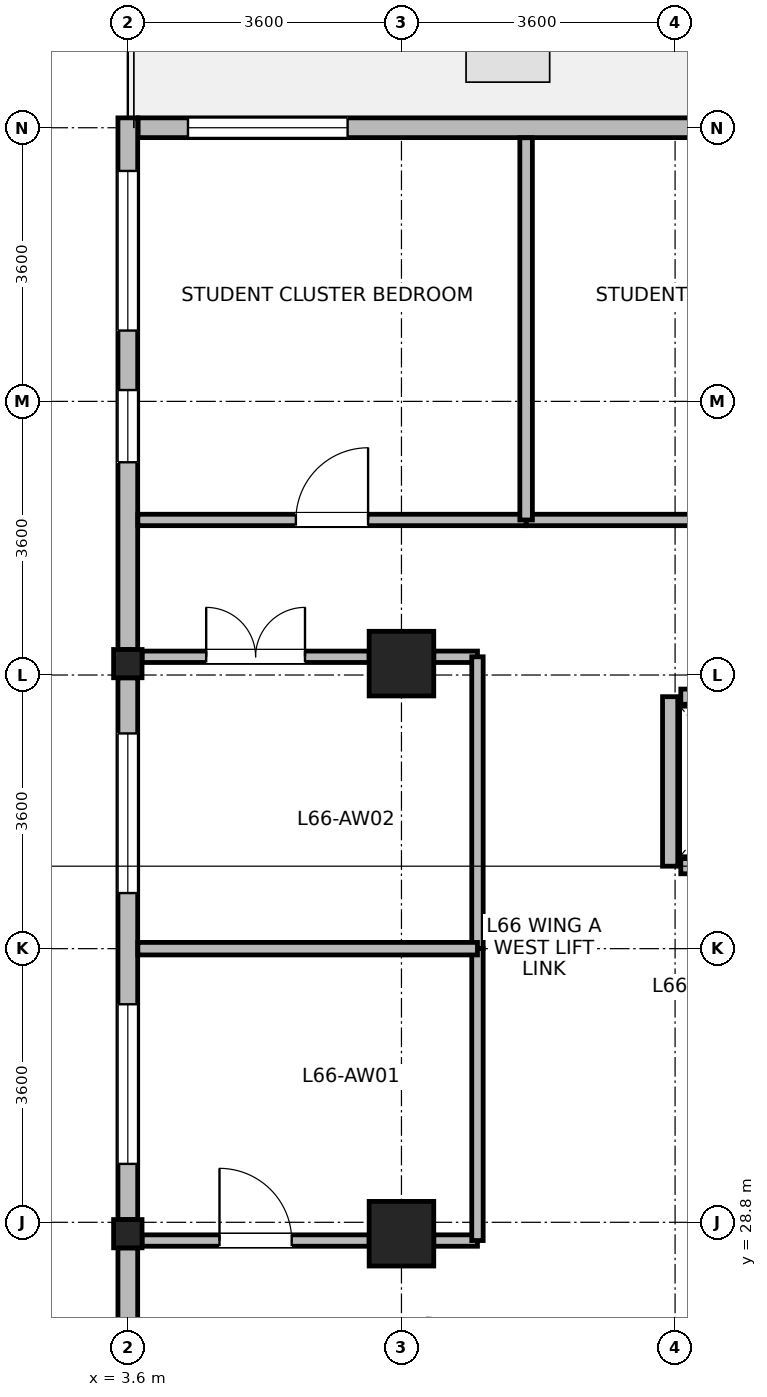
"""IFC4 building model, lengths in metres.
Left out: names, types, materials, properties, quantities, classifications, styles, units other than length and angle.
Written with IfcOpenShell. Run it as: python <this file> out.ifc"""

import sys

from ifc_helpers import new_model, si_unit, direction, frame, frame_2d, origin, origin_2d, place, context, subcontext, project, spatial, rectangle, i_section, extrude, source, transform, mapped, element, fill, save


model = new_model("IFC4")
c1 = context("Model", 3, precision=1e-05, world=origin(), true_north=direction((0.0, 1.0)))
c2 = subcontext(c1, "Body", "Model", "MODEL_VIEW")
j1 = project(units=[si_unit("LENGTHUNIT", "METRE"), si_unit("PLANEANGLEUNIT", "RADIAN")], contexts=[c1])
p1 = place(None, origin())
s1 = spatial("IfcSite", under=j1, at=p1, CompositionType="ELEMENT")
p2 = place(p1, origin())
s2 = spatial("IfcBuilding", under=s1, at=p2, CompositionType="ELEMENT")
p3 = place(p2, frame((0.0, 0.0, 257.3)))
s3 = spatial("IfcBuildingStorey", under=s2, at=p3, CompositionType="ELEMENT", Elevation=257.3)
m1 = source(origin(), c2, "Body", "SweptSolid", [
    extrude(rectangle(XDim=0.85, YDim=0.85, at=origin_2d()), origin(), (0.0, 0.0, 1.0), 3.7),
])
for number, where, z_axis, x_axis in (
    (1, (7.2, 28.65, 0.0), (0.0, 0.0, 1.0), (1.0, 0.0, 0.0)),
    (2, (7.2, 36.15, 0.0), (0.0, 0.0, 1.0), (1.0, 0.0, 0.0)),
):
    element("IfcColumn", number, at=place(p3, frame(where, z_axis=z_axis, x_axis=x_axis)), inside=s3, PredefinedType="COLUMN", context=c2, shape_type="MappedRepresentation", body=[
        mapped(m1, transform((0.0, 0.0, 0.0), x_axis=(1.0, 0.0, 0.0), y_axis=(0.0, 1.0, 0.0), z_axis=(0.0, 0.0, 1.0), scale=1.0)),
    ])
m2 = source(origin(), c2, "Body", "SweptSolid", [
    extrude(i_section(OverallWidth=0.374, OverallDepth=0.372, WebThickness=0.015, FlangeThickness=0.026, FilletRadius=0.015, at=origin_2d()), origin(), (0.0, 0.0, 1.0), 3.7),
])
for number, where, z_axis, x_axis in (
    (3, (3.6, 28.65, 0.0), (0.0, 0.0, 1.0), (1.0, 0.0, 0.0)),
    (4, (3.6, 36.15, 0.0), (0.0, 0.0, 1.0), (1.0, 0.0, 0.0)),
):
    element("IfcColumn", number, at=place(p3, frame(where, z_axis=z_axis, x_axis=x_axis)), inside=s3, PredefinedType="COLUMN", context=c2, shape_type="MappedRepresentation", body=[
        mapped(m2, transform((0.0, 0.0, 0.0), x_axis=(1.0, 0.0, 0.0), y_axis=(0.0, 1.0, 0.0), z_axis=(0.0, 0.0, 1.0), scale=1.0)),
    ])
p4 = place(p3, frame((3.735, 43.2, 0.0), z_axis=(0.0, 0.0, 1.0), x_axis=(1.0, 0.0, 0.0)))
e5 = element("IfcWall", 5, at=p4, inside=s3, PredefinedType="STANDARD", context=c2, shape_type="SweptSolid", body=[
    extrude(rectangle(XDim=10.239, YDim=0.26, at=frame_2d((5.12, 0.0))), origin(), (0.0, 0.0, 1.0), 3.455),
])
p5 = place(p4, frame((0.656, 0.0, 0.85)))
e6 = element("IfcOpeningElement", 6, at=p5, cuts=e5, PredefinedType="OPENING", context=c2, shape_type="SweptSolid", body=[
    extrude(rectangle(XDim=2.1, YDim=1.95, at=frame_2d((1.05, 0.975))), frame((0.0, 0.14, 0.0), z_axis=(0.0, -1.0, 0.0), x_axis=(1.0, 0.0, 0.0)), (0.0, 0.0, 1.0), 0.28),
])
p6 = place(p4, frame((7.482, 0.0, 0.85)))
e7 = element("IfcOpeningElement", 7, at=p6, cuts=e5, PredefinedType="OPENING", context=c2, shape_type="SweptSolid", body=[
    extrude(rectangle(XDim=2.1, YDim=1.95, at=frame_2d((1.05, 0.975))), frame((0.0, 0.14, 0.0), z_axis=(0.0, -1.0, 0.0), x_axis=(1.0, 0.0, 0.0)), (0.0, 0.0, 1.0), 0.28),
])
p7 = place(p3, frame((3.6, 36.337, 0.0), z_axis=(0.0, 0.0, 1.0), x_axis=(0.0, 1.0, 0.0)))
e8 = element("IfcWall", 8, at=p7, inside=s3, PredefinedType="STANDARD", context=c2, shape_type="SweptSolid", body=[
    extrude(rectangle(XDim=6.993, YDim=0.26, at=frame_2d((3.497, 0.0))), origin(), (0.0, 0.0, 1.0), 3.455),
])
p8 = place(p7, frame((4.195, 0.0, 0.85)))
e9 = element("IfcOpeningElement", 9, at=p8, cuts=e8, PredefinedType="OPENING", context=c2, shape_type="SweptSolid", body=[
    extrude(rectangle(XDim=2.1, YDim=1.95, at=frame_2d((1.05, 0.975))), frame((0.0, 0.14, 0.0), z_axis=(0.0, -1.0, 0.0), x_axis=(1.0, 0.0, 0.0)), (0.0, 0.0, 1.0), 0.28),
])
p9 = place(p7, frame((2.462, 0.0, 0.85)))
e10 = element("IfcOpeningElement", 10, at=p9, cuts=e8, PredefinedType="OPENING", context=c2, shape_type="SweptSolid", body=[
    extrude(rectangle(XDim=0.95, YDim=1.75, at=frame_2d((0.475, 0.875))), frame((0.0, 0.14, 0.0), z_axis=(0.0, -1.0, 0.0), x_axis=(1.0, 0.0, 0.0)), (0.0, 0.0, 1.0), 0.28),
])
p10 = place(p3, frame((3.6, 28.837, 0.0), z_axis=(0.0, 0.0, 1.0), x_axis=(0.0, 1.0, 0.0)))
e11 = element("IfcWall", 11, at=p10, inside=s3, PredefinedType="STANDARD", context=c2, shape_type="SweptSolid", body=[
    extrude(rectangle(XDim=7.126, YDim=0.26, at=frame_2d((3.563, 0.0))), origin(), (0.0, 0.0, 1.0), 3.055),
])
p11 = place(p10, frame((0.731, 0.0, 0.85)))
e12 = element("IfcOpeningElement", 12, at=p11, cuts=e11, PredefinedType="OPENING", context=c2, shape_type="SweptSolid", body=[
    extrude(rectangle(XDim=2.1, YDim=1.95, at=frame_2d((1.05, 0.975))), frame((0.0, 0.14, 0.0), z_axis=(0.0, -1.0, 0.0), x_axis=(1.0, 0.0, 0.0)), (0.0, 0.0, 1.0), 0.28),
])
p12 = place(p10, frame((4.294, 0.0, 0.85)))
e13 = element("IfcOpeningElement", 13, at=p12, cuts=e11, PredefinedType="OPENING", context=c2, shape_type="SweptSolid", body=[
    extrude(rectangle(XDim=2.1, YDim=1.95, at=frame_2d((1.05, 0.975))), frame((0.0, 0.14, 0.0), z_axis=(0.0, -1.0, 0.0), x_axis=(1.0, 0.0, 0.0)), (0.0, 0.0, 1.0), 0.28),
])
p13 = place(p3, frame((3.6, 21.47, 0.0), z_axis=(0.0, 0.0, 1.0), x_axis=(0.0, 1.0, 0.0)))
e14 = element("IfcWall", 14, at=p13, inside=s3, PredefinedType="STANDARD", context=c2, shape_type="SweptSolid", body=[
    extrude(rectangle(XDim=6.993, YDim=0.26, at=frame_2d((3.497, 0.0))), origin(), (0.0, 0.0, 1.0), 3.455),
])
p14 = place(p13, frame((0.698, 0.0, 0.85)))
e15 = element("IfcOpeningElement", 15, at=p14, cuts=e14, PredefinedType="OPENING", context=c2, shape_type="SweptSolid", body=[
    extrude(rectangle(XDim=2.1, YDim=1.95, at=frame_2d((1.05, 0.975))), frame((0.0, 0.14, 0.0), z_axis=(0.0, -1.0, 0.0), x_axis=(1.0, 0.0, 0.0)), (0.0, 0.0, 1.0), 0.28),
])
p15 = place(p13, frame((3.581, 0.0, 0.85)))
e16 = element("IfcOpeningElement", 16, at=p15, cuts=e14, PredefinedType="OPENING", context=c2, shape_type="SweptSolid", body=[
    extrude(rectangle(XDim=0.95, YDim=1.75, at=frame_2d((0.475, 0.875))), frame((0.0, 0.14, 0.0), z_axis=(0.0, -1.0, 0.0), x_axis=(1.0, 0.0, 0.0)), (0.0, 0.0, 1.0), 0.28),
])
p16 = place(p3, frame((10.875, 33.485, 0.0), z_axis=(0.0, 0.0, 1.0), x_axis=(1.0, 0.0, 0.0)))
e17 = element("IfcWall", 17, at=p16, inside=s3, PredefinedType="PARTITIONING", context=c2, shape_type="SweptSolid", body=[
    extrude(rectangle(XDim=1.65, YDim=0.2, at=frame_2d((0.825, 0.0))), origin(), (0.0, 0.0, 1.0), 3.455),
])
p17 = place(p16, frame((0.275, 0.0, 0.0)))
e18 = element("IfcOpeningElement", 18, at=p17, cuts=e17, PredefinedType="OPENING", context=c2, shape_type="SweptSolid", body=[
    extrude(rectangle(XDim=1.1, YDim=2.12, at=frame_2d((0.55, 1.06))), frame((0.0, 0.11, 0.0), z_axis=(0.0, -1.0, 0.0), x_axis=(1.0, 0.0, 0.0)), (0.0, 0.0, 1.0), 0.22),
])
p18 = place(p3, frame((10.875, 35.715, 0.0), z_axis=(0.0, 0.0, 1.0), x_axis=(1.0, 0.0, 0.0)))
e19 = element("IfcWall", 19, at=p18, inside=s3, PredefinedType="PARTITIONING", context=c2, shape_type="SweptSolid", body=[
    extrude(rectangle(XDim=1.65, YDim=0.2, at=frame_2d((0.825, 0.0))), origin(), (0.0, 0.0, 1.0), 3.455),
])
p19 = place(p3, frame((10.735, 33.485, 0.0), z_axis=(0.0, 0.0, 1.0), x_axis=(0.0, 1.0, 0.0)))
e20 = element("IfcWall", 20, at=p19, inside=s3, PredefinedType="PARTITIONING", context=c2, shape_type="SweptSolid", body=[
    extrude(rectangle(XDim=2.23, YDim=0.2, at=frame_2d((1.115, 0.0))), origin(), (0.0, 0.0, 1.0), 3.455),
])
p20 = place(p3, frame((8.84, 38.04, 0.0), z_axis=(0.0, 0.0, 1.0), x_axis=(1.0, 0.0, 0.0)))
e21 = element("IfcWall", 21, at=p20, inside=s3, PredefinedType="PARTITIONING", context=c2, shape_type="SweptSolid", body=[
    extrude(rectangle(XDim=5.66, YDim=0.15, at=frame_2d((2.83, 0.0))), origin(), (0.0, 0.0, 1.0), 3.455),
])
p21 = place(p20, frame((2.355, 0.0, 0.0)))
e22 = element("IfcOpeningElement", 22, at=p21, cuts=e21, PredefinedType="OPENING", context=c2, shape_type="SweptSolid", body=[
    extrude(rectangle(XDim=0.95, YDim=2.1, at=frame_2d((0.475, 1.05))), frame((0.0, 0.085, 0.0), z_axis=(0.0, -1.0, 0.0), x_axis=(1.0, 0.0, 0.0)), (0.0, 0.0, 1.0), 0.17),
])
p22 = place(p3, frame((3.732, 38.04, 0.0), z_axis=(0.0, 0.0, 1.0), x_axis=(1.0, 0.0, 0.0)))
e23 = element("IfcWall", 23, at=p22, inside=s3, PredefinedType="PARTITIONING", context=c2, shape_type="SweptSolid", body=[
    extrude(rectangle(XDim=5.108, YDim=0.15, at=frame_2d((2.554, 0.0))), origin(), (0.0, 0.0, 1.0), 3.455),
])
p23 = place(p22, frame((2.079, 0.0, 0.0)))
e24 = element("IfcOpeningElement", 24, at=p23, cuts=e23, PredefinedType="OPENING", context=c2, shape_type="SweptSolid", body=[
    extrude(rectangle(XDim=0.95, YDim=2.1, at=frame_2d((0.475, 1.05))), frame((0.0, 0.085, 0.0), z_axis=(0.0, -1.0, 0.0), x_axis=(1.0, 0.0, 0.0)), (0.0, 0.0, 1.0), 0.17),
])
p24 = place(p3, frame((3.787, 28.56, 0.0), z_axis=(0.0, 0.0, 1.0), x_axis=(1.0, 0.0, 0.0)))
e25 = element("IfcWall", 25, at=p24, inside=s3, PredefinedType="PARTITIONING", context=c2, shape_type="SweptSolid", body=[
    extrude(rectangle(XDim=2.988, YDim=0.15, at=frame_2d((1.494, 0.0))), origin(), (0.0, 0.0, 1.0), 2.905),
])
p25 = place(p24, frame((1.019, 0.0, 0.0)))
e26 = element("IfcOpeningElement", 26, at=p25, cuts=e25, PredefinedType="OPENING", context=c2, shape_type="SweptSolid", body=[
    extrude(rectangle(XDim=0.95, YDim=2.1, at=frame_2d((0.475, 1.05))), frame((0.0, 0.085, 0.0), z_axis=(0.0, -1.0, 0.0), x_axis=(1.0, 0.0, 0.0)), (0.0, 0.0, 1.0), 0.17),
])
p26 = place(p3, frame((7.625, 28.56, 0.0), z_axis=(0.0, 0.0, 1.0), x_axis=(1.0, 0.0, 0.0)))
e27 = element("IfcWall", 27, at=p26, inside=s3, PredefinedType="PARTITIONING", context=c2, shape_type="SweptSolid", body=[
    extrude(rectangle(XDim=0.575, YDim=0.15, at=frame_2d((0.288, 0.0))), origin(), (0.0, 0.0, 1.0), 2.905),
])
p27 = place(p3, frame((3.787, 36.24, 0.0), z_axis=(0.0, 0.0, 1.0), x_axis=(1.0, 0.0, 0.0)))
e28 = element("IfcWall", 28, at=p27, inside=s3, PredefinedType="PARTITIONING", context=c2, shape_type="SweptSolid", body=[
    extrude(rectangle(XDim=2.988, YDim=0.15, at=frame_2d((1.494, 0.0))), origin(), (0.0, 0.0, 1.0), 2.905),
])
p28 = place(p27, frame((0.844, 0.0, 0.0)))
e29 = element("IfcOpeningElement", 29, at=p28, cuts=e28, PredefinedType="OPENING", context=c2, shape_type="SweptSolid", body=[
    extrude(rectangle(XDim=1.3, YDim=2.12, at=frame_2d((0.65, 1.06))), frame((0.0, 0.085, 0.0), z_axis=(0.0, -1.0, 0.0), x_axis=(1.0, 0.0, 0.0)), (0.0, 0.0, 1.0), 0.17),
])
p29 = place(p3, frame((7.625, 36.24, 0.0), z_axis=(0.0, 0.0, 1.0), x_axis=(1.0, 0.0, 0.0)))
e30 = element("IfcWall", 30, at=p29, inside=s3, PredefinedType="PARTITIONING", context=c2, shape_type="SweptSolid", body=[
    extrude(rectangle(XDim=0.575, YDim=0.15, at=frame_2d((0.288, 0.0))), origin(), (0.0, 0.0, 1.0), 2.905),
])
p30 = place(p3, frame((8.2, 32.4, 0.0), z_axis=(0.0, 0.0, 1.0), x_axis=(0.0, 1.0, 0.0)))
e31 = element("IfcWall", 31, at=p30, inside=s3, PredefinedType="PARTITIONING", context=c2, shape_type="SweptSolid", body=[
    extrude(rectangle(XDim=3.84, YDim=0.15, at=frame_2d((1.92, 0.0))), origin(), (0.0, 0.0, 1.0), 3.455),
])
p31 = place(p3, frame((8.2, 28.56, 0.0), z_axis=(0.0, 0.0, 1.0), x_axis=(0.0, 1.0, 0.0)))
e32 = element("IfcWall", 32, at=p31, inside=s3, PredefinedType="PARTITIONING", context=c2, shape_type="SweptSolid", body=[
    extrude(rectangle(XDim=3.84, YDim=0.15, at=frame_2d((1.92, 0.0))), origin(), (0.0, 0.0, 1.0), 3.455),
])
p32 = place(p3, frame((8.84, 38.04, 0.0), z_axis=(0.0, 0.0, 1.0), x_axis=(0.0, 1.0, 0.0)))
e33 = element("IfcWall", 33, at=p32, inside=s3, PredefinedType="PARTITIONING", context=c2, shape_type="SweptSolid", body=[
    extrude(rectangle(XDim=5.028, YDim=0.165, at=frame_2d((2.514, 0.0))), origin(), (0.0, 0.0, 1.0), 3.455),
])
p33 = place(p3, frame((3.732, 32.4, 0.0), z_axis=(0.0, 0.0, 1.0), x_axis=(1.0, 0.0, 0.0)))
e34 = element("IfcWall", 34, at=p33, inside=s3, PredefinedType="PARTITIONING", context=c2, shape_type="SweptSolid", body=[
    extrude(rectangle(XDim=4.468, YDim=0.165, at=frame_2d((2.234, 0.0))), origin(), (0.0, 0.0, 1.0), 3.455),
])
p34 = place(p5, origin())
e35 = element("IfcWindow", 35, at=p34, inside=s3, PartitioningType="SINGLE_PANEL", PredefinedType="WINDOW", context=c2, shape_type="SweptSolid", body=[
    extrude(rectangle(XDim=2.1, YDim=1.95, at=frame_2d((1.05, 0.975))), frame((0.0, 0.03, 0.0), z_axis=(0.0, -1.0, 0.0), x_axis=(1.0, 0.0, 0.0)), (0.0, 0.0, 1.0), 0.06),
])
fill(e6, e35)
p35 = place(p8, origin())
e36 = element("IfcWindow", 36, at=p35, inside=s3, PartitioningType="SINGLE_PANEL", PredefinedType="WINDOW", context=c2, shape_type="SweptSolid", body=[
    extrude(rectangle(XDim=2.1, YDim=1.95, at=frame_2d((1.05, 0.975))), frame((0.0, 0.03, 0.0), z_axis=(0.0, -1.0, 0.0), x_axis=(1.0, 0.0, 0.0)), (0.0, 0.0, 1.0), 0.06),
])
fill(e9, e36)
p36 = place(p9, origin())
e37 = element("IfcWindow", 37, at=p36, inside=s3, PartitioningType="SINGLE_PANEL", PredefinedType="WINDOW", context=c2, shape_type="SweptSolid", body=[
    extrude(rectangle(XDim=0.95, YDim=1.75, at=frame_2d((0.475, 0.875))), frame((0.0, 0.03, 0.0), z_axis=(0.0, -1.0, 0.0), x_axis=(1.0, 0.0, 0.0)), (0.0, 0.0, 1.0), 0.06),
])
fill(e10, e37)
p37 = place(p11, origin())
e38 = element("IfcWindow", 38, at=p37, inside=s3, PartitioningType="SINGLE_PANEL", PredefinedType="WINDOW", context=c2, shape_type="SweptSolid", body=[
    extrude(rectangle(XDim=2.1, YDim=1.95, at=frame_2d((1.05, 0.975))), frame((0.0, 0.03, 0.0), z_axis=(0.0, -1.0, 0.0), x_axis=(1.0, 0.0, 0.0)), (0.0, 0.0, 1.0), 0.06),
])
fill(e12, e38)
p38 = place(p12, origin())
e39 = element("IfcWindow", 39, at=p38, inside=s3, PartitioningType="SINGLE_PANEL", PredefinedType="WINDOW", context=c2, shape_type="SweptSolid", body=[
    extrude(rectangle(XDim=2.1, YDim=1.95, at=frame_2d((1.05, 0.975))), frame((0.0, 0.03, 0.0), z_axis=(0.0, -1.0, 0.0), x_axis=(1.0, 0.0, 0.0)), (0.0, 0.0, 1.0), 0.06),
])
fill(e13, e39)
p39 = place(p23, origin())
e40 = element("IfcDoor", 40, at=p39, inside=s3, OperationType="SINGLE_SWING_RIGHT", PredefinedType="DOOR", context=c2, shape_type="SweptSolid", body=[
    extrude(rectangle(XDim=0.95, YDim=2.1, at=frame_2d((0.475, 1.05))), frame((0.0, 0.025, 0.0), z_axis=(0.0, -1.0, 0.0), x_axis=(1.0, 0.0, 0.0)), (0.0, 0.0, 1.0), 0.05),
])
fill(e24, e40)
p40 = place(p25, origin())
e41 = element("IfcDoor", 41, at=p40, inside=s3, OperationType="SINGLE_SWING_LEFT", PredefinedType="DOOR", context=c2, shape_type="SweptSolid", body=[
    extrude(rectangle(XDim=0.95, YDim=2.1, at=frame_2d((0.475, 1.05))), frame((0.0, 0.025, 0.0), z_axis=(0.0, -1.0, 0.0), x_axis=(1.0, 0.0, 0.0)), (0.0, 0.0, 1.0), 0.05),
])
fill(e26, e41)
p41 = place(p28, origin())
e42 = element("IfcDoor", 42, at=p41, inside=s3, OperationType="DOUBLE_DOOR_SINGLE_SWING", PredefinedType="DOOR", context=c2, shape_type="SweptSolid", body=[
    extrude(rectangle(XDim=1.3, YDim=2.12, at=frame_2d((0.65, 1.06))), frame((0.0, 0.025, 0.0), z_axis=(0.0, -1.0, 0.0), x_axis=(1.0, 0.0, 0.0)), (0.0, 0.0, 1.0), 0.05),
])
fill(e29, e42)
save(model, sys.argv[1])
